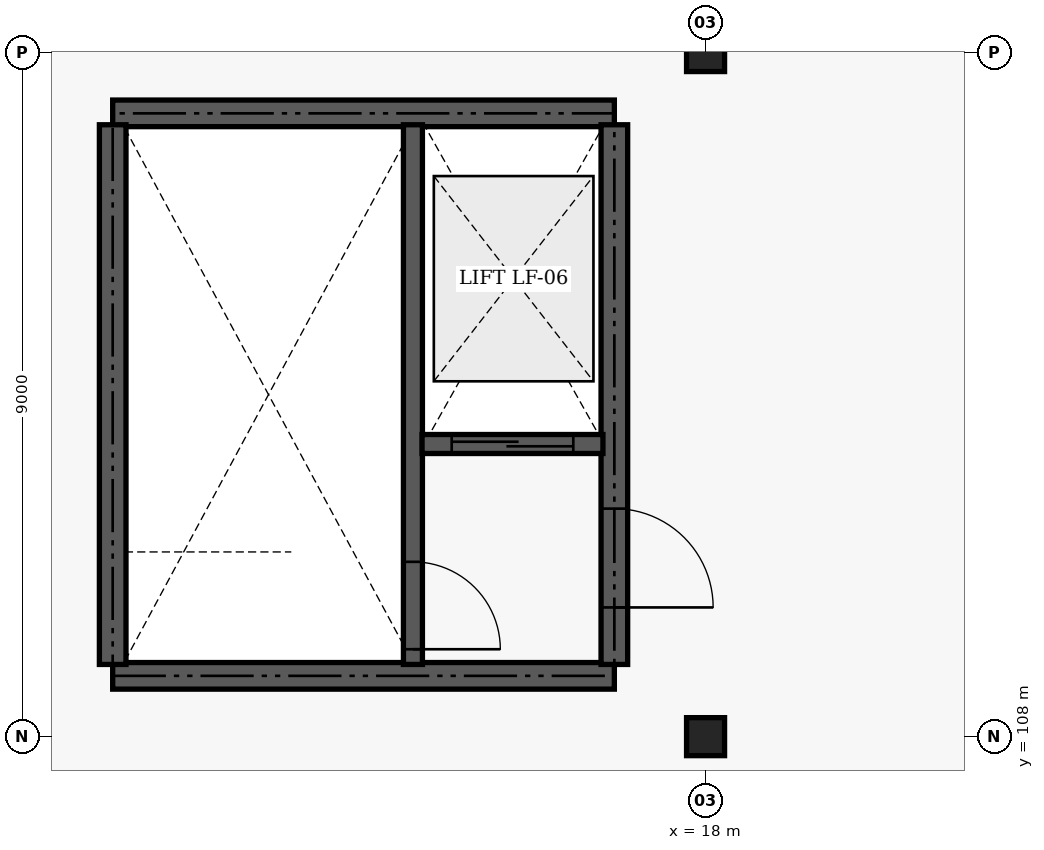
"""IFC4 building model, lengths in metres.
Left out: names, types, materials, properties, quantities, classifications, styles, units other than length and angle.
Written with IfcOpenShell. Run it as: python <this file> out.ifc"""

import sys

from ifc_helpers import new_model, si_unit, direction, frame, frame_2d, origin, origin_2d, place, context, subcontext, project, spatial, rectangle, extrude, element, fill, save


model = new_model("IFC4")
c1 = context("Model", 3, precision=1e-05, world=origin(), true_north=direction((0.0, 1.0)))
c2 = subcontext(c1, "Body", "Model", "MODEL_VIEW")
j1 = project(units=[si_unit("LENGTHUNIT", "METRE"), si_unit("PLANEANGLEUNIT", "RADIAN")], contexts=[c1])
p1 = place(None, origin())
s1 = spatial("IfcSite", under=j1, at=p1, CompositionType="ELEMENT")
p2 = place(p1, origin())
s2 = spatial("IfcBuilding", under=s1, at=p2, CompositionType="ELEMENT")
p3 = place(p2, frame((0.0, 0.0, 9.6)))
s3 = spatial("IfcBuildingStorey", under=s2, at=p3, CompositionType="ELEMENT", Elevation=9.6)
for number, where, z_axis, x_axis in (
    (1, (18.0, 108.0, 0.0), (0.0, 0.0, 1.0), (1.0, 0.0, 0.0)),
    (2, (18.0, 117.0, 0.0), (0.0, 0.0, 1.0), (1.0, 0.0, 0.0)),
):
    element("IfcColumn", number, at=place(p3, frame(where, z_axis=z_axis, x_axis=x_axis)), inside=s3, PredefinedType="COLUMN", context=c2, shape_type="SweptSolid", body=[
        extrude(rectangle(XDim=0.5, YDim=0.5, at=origin_2d()), origin(), (0.0, 0.0, 1.0), 3.9),
    ])
for number, where, z_axis, x_axis in (
    (3, (10.2, 108.8, 0.0), (0.0, 0.0, 1.0), (1.0, 0.0, 0.0)),
    (4, (10.2, 116.2, 0.0), (0.0, 0.0, 1.0), (1.0, 0.0, 0.0)),
):
    element("IfcWall", number, at=place(p3, frame(where, z_axis=z_axis, x_axis=x_axis)), inside=s3, PredefinedType="SHEAR", context=c2, shape_type="SweptSolid", body=[
        extrude(rectangle(XDim=6.6, YDim=0.35, at=frame_2d((3.3, 0.0))), origin(), (0.0, 0.0, 1.0), 3.7),
    ])
p4 = place(p3, frame((10.2, 108.95, 0.0), z_axis=(0.0, 0.0, 1.0), x_axis=(0.0, 1.0, 0.0)))
e5 = element("IfcWall", 5, at=p4, inside=s3, PredefinedType="SHEAR", context=c2, shape_type="SweptSolid", body=[
    extrude(rectangle(XDim=7.1, YDim=0.35, at=frame_2d((3.55, 0.0))), origin(), (0.0, 0.0, 1.0), 3.7),
])
p5 = place(p3, frame((16.8, 108.95, 0.0), z_axis=(0.0, 0.0, 1.0), x_axis=(0.0, 1.0, 0.0)))
e6 = element("IfcWall", 6, at=p5, inside=s3, PredefinedType="SHEAR", context=c2, shape_type="SweptSolid", body=[
    extrude(rectangle(XDim=7.1, YDim=0.35, at=frame_2d((3.55, 0.0))), origin(), (0.0, 0.0, 1.0), 3.7),
])
p6 = place(p5, frame((0.75, 0.0, 0.0)))
e7 = element("IfcOpeningElement", 7, at=p6, cuts=e6, PredefinedType="OPENING", context=c2, shape_type="SweptSolid", body=[
    extrude(rectangle(XDim=1.3, YDim=2.15, at=frame_2d((0.65, 1.075))), frame((0.0, 0.185, 0.0), z_axis=(0.0, -1.0, 0.0), x_axis=(1.0, 0.0, 0.0)), (0.0, 0.0, 1.0), 0.37),
])
p7 = place(p3, frame((14.15, 108.95, 0.0), z_axis=(0.0, 0.0, 1.0), x_axis=(0.0, 1.0, 0.0)))
e8 = element("IfcWall", 8, at=p7, inside=s3, PredefinedType="SHEAR", context=c2, shape_type="SweptSolid", body=[
    extrude(rectangle(XDim=7.1, YDim=0.25, at=frame_2d((3.55, 0.0))), origin(), (0.0, 0.0, 1.0), 3.7),
])
p8 = place(p7, frame((0.2, 0.0, 0.0)))
e9 = element("IfcOpeningElement", 9, at=p8, cuts=e8, PredefinedType="OPENING", context=c2, shape_type="SweptSolid", body=[
    extrude(rectangle(XDim=1.15, YDim=2.15, at=frame_2d((0.575, 1.075))), frame((0.0, 0.135, 0.0), z_axis=(0.0, -1.0, 0.0), x_axis=(1.0, 0.0, 0.0)), (0.0, 0.0, 1.0), 0.27),
])
p9 = place(p3, frame((14.27, 111.85, 0.0), z_axis=(0.0, 0.0, 1.0), x_axis=(1.0, 0.0, 0.0)))
e10 = element("IfcWall", 10, at=p9, inside=s3, PredefinedType="SHEAR", context=c2, shape_type="SweptSolid", body=[
    extrude(rectangle(XDim=2.38, YDim=0.25, at=frame_2d((1.19, 0.0))), origin(), (0.0, 0.0, 1.0), 3.7),
])
p10 = place(p9, frame((0.39, 0.0, 0.0)))
e11 = element("IfcOpeningElement", 11, at=p10, cuts=e10, PredefinedType="OPENING", context=c2, shape_type="SweptSolid", body=[
    extrude(rectangle(XDim=1.6, YDim=2.3, at=frame_2d((0.8, 1.15))), frame((0.0, 0.135, 0.0), z_axis=(0.0, -1.0, 0.0), x_axis=(1.0, 0.0, 0.0)), (0.0, 0.0, 1.0), 0.27),
])
p11 = place(p6, frame((1.3, 0.0, 0.0), z_axis=(0.0, 0.0, 1.0), x_axis=(-1.0, 0.0, 0.0)))
e12 = element("IfcDoor", 12, at=p11, inside=s3, OperationType="DOUBLE_DOOR_SINGLE_SWING", PredefinedType="DOOR", context=c2, shape_type="SweptSolid", body=[
    extrude(rectangle(XDim=1.3, YDim=2.15, at=frame_2d((0.65, 1.075))), frame((0.0, 0.025, 0.0), z_axis=(0.0, -1.0, 0.0), x_axis=(1.0, 0.0, 0.0)), (0.0, 0.0, 1.0), 0.05),
])
fill(e7, e12)
p12 = place(p8, frame((1.15, 0.0, 0.0), z_axis=(0.0, 0.0, 1.0), x_axis=(-1.0, 0.0, 0.0)))
e13 = element("IfcDoor", 13, at=p12, inside=s3, OperationType="SINGLE_SWING_LEFT", PredefinedType="DOOR", context=c2, shape_type="SweptSolid", body=[
    extrude(rectangle(XDim=1.15, YDim=2.15, at=frame_2d((0.575, 1.075))), frame((0.0, 0.025, 0.0), z_axis=(0.0, -1.0, 0.0), x_axis=(1.0, 0.0, 0.0)), (0.0, 0.0, 1.0), 0.05),
])
fill(e9, e13)
p13 = place(p10, origin())
e14 = element("IfcDoor", 14, at=p13, inside=s3, OperationType="SLIDING_TO_LEFT", PredefinedType="DOOR", context=c2, shape_type="SweptSolid", body=[
    extrude(rectangle(XDim=1.6, YDim=2.3, at=frame_2d((0.8, 1.15))), frame((0.0, 0.025, 0.0), z_axis=(0.0, -1.0, 0.0), x_axis=(1.0, 0.0, 0.0)), (0.0, 0.0, 1.0), 0.05),
])
fill(e11, e14)
save(model, sys.argv[1])
